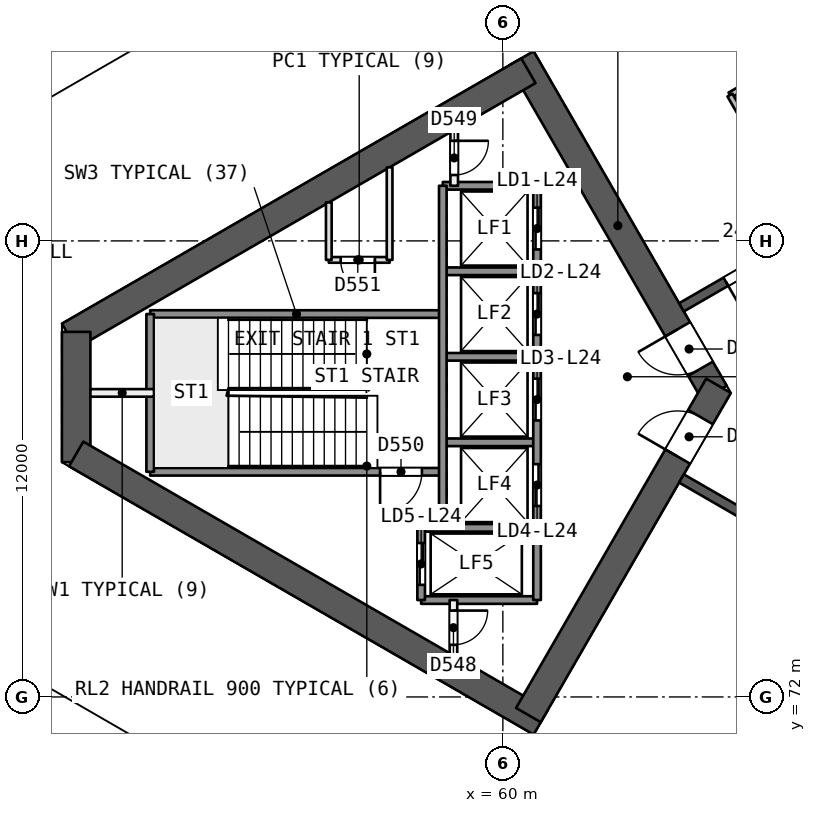
"""IFC4 building model, lengths in metres.
Left out: names, types, materials, properties, quantities, classifications, styles, units other than length and angle.
Written with IfcOpenShell. Run it as: python <this file> out.ifc"""

import sys

from ifc_helpers import new_model, si_unit, direction, frame, frame_2d, origin, place, context, subcontext, project, spatial, rectangle, extrude, element, fill, save


model = new_model("IFC4")
c1 = context("Model", 3, precision=1e-05, world=origin(), true_north=direction((0.0, 1.0)))
c2 = subcontext(c1, "Body", "Model", "MODEL_VIEW")
j1 = project(units=[si_unit("LENGTHUNIT", "METRE"), si_unit("PLANEANGLEUNIT", "RADIAN")], contexts=[c1])
p1 = place(None, origin())
s1 = spatial("IfcSite", under=j1, at=p1, CompositionType="ELEMENT")
p2 = place(p1, origin())
s2 = spatial("IfcBuilding", under=s1, at=p2, CompositionType="ELEMENT")
p3 = place(p2, frame((0.0, 0.0, 102.4)))
s3 = spatial("IfcBuildingStorey", under=s2, at=p3, CompositionType="ELEMENT", Elevation=102.4)
p4 = place(p3, frame((65.567, 80.0, 0.0), z_axis=(0.0, 0.0, 1.0), x_axis=(-0.499988615364, 0.866031976607, 0.0)))
e1 = element("IfcWall", 1, at=p4, inside=s3, PredefinedType="SHEAR", context=c2, shape_type="SweptSolid", body=[
    extrude(rectangle(XDim=10.163, YDim=0.75, at=frame_2d((5.082, 0.0))), origin(), (0.0, 0.0, 1.0), 4.4),
])
p5 = place(p4, frame((0.733, 0.0, 0.0)))
e2 = element("IfcOpeningElement", 2, at=p5, cuts=e1, PredefinedType="OPENING", context=c2, shape_type="SweptSolid", body=[
    extrude(rectangle(XDim=1.2, YDim=2.1, at=frame_2d((0.6, 1.05))), frame((0.0, 0.385, 0.0), z_axis=(0.0, -1.0, 0.0), x_axis=(1.0, 0.0, 0.0)), (0.0, 0.0, 1.0), 0.771),
])
p6 = place(p3, frame((60.673, 88.477, 0.0), z_axis=(0.0, 0.0, 1.0), x_axis=(-0.8660248072, -0.500001033313, 0.0)))
e3 = element("IfcWall", 3, at=p6, inside=s3, PredefinedType="SHEAR", context=c2, shape_type="SweptSolid", body=[
    extrude(rectangle(XDim=13.958, YDim=0.75, at=frame_2d((6.979, 0.0))), origin(), (0.0, 0.0, 1.0), 4.4),
])
p7 = place(p3, frame((48.772, 81.606, 0.0), z_axis=(0.0, 0.0, 1.0), x_axis=(0.0, -1.0, 0.0)))
e4 = element("IfcWall", 4, at=p7, inside=s3, PredefinedType="SHEAR", context=c2, shape_type="SweptSolid", body=[
    extrude(rectangle(XDim=3.429, YDim=0.75, at=frame_2d((1.714, 0.0))), origin(), (0.0, 0.0, 1.0), 4.4),
])
p8 = place(p3, frame((48.772, 78.394, 0.0), z_axis=(0.0, 0.0, 1.0), x_axis=(0.866028339916, -0.499994914436, 0.0)))
e5 = element("IfcWall", 5, at=p8, inside=s3, PredefinedType="SHEAR", context=c2, shape_type="SweptSolid", body=[
    extrude(rectangle(XDim=14.117, YDim=0.75, at=frame_2d((7.059, 0.0))), origin(), (0.0, 0.0, 1.0), 4.4),
])
p9 = place(p3, frame((60.673, 71.523, 0.0), z_axis=(0.0, 0.0, 1.0), x_axis=(0.499997052475, 0.866027105532, 0.0)))
e6 = element("IfcWall", 6, at=p9, inside=s3, PredefinedType="SHEAR", context=c2, shape_type="SweptSolid", body=[
    extrude(rectangle(XDim=10.005, YDim=0.75, at=frame_2d((5.002, 0.0))), origin(), (0.0, 0.0, 1.0), 4.4),
])
p10 = place(p9, frame((7.855, 0.0, 0.0)))
e7 = element("IfcOpeningElement", 7, at=p10, cuts=e6, PredefinedType="OPENING", context=c2, shape_type="SweptSolid", body=[
    extrude(rectangle(XDim=1.2, YDim=2.1, at=frame_2d((0.6, 1.05))), frame((0.0, 0.385, 0.0), z_axis=(0.0, -1.0, 0.0), x_axis=(1.0, 0.0, 0.0)), (0.0, 0.0, 1.0), 0.771),
])
p11 = place(p3, frame((78.2, 90.046, 0.0), z_axis=(0.0, 0.0, 1.0), x_axis=(-0.866026492143, -0.499998114903, 0.0)))
e8 = element("IfcWall", 8, at=p11, inside=s3, PredefinedType="SHEAR", context=c2, shape_type="SweptSolid", body=[
    extrude(rectangle(XDim=15.588, YDim=0.25, at=frame_2d((7.794, 0.0))), origin(), (0.0, 0.0, 1.0), 3.95),
])
p12 = place(p11, frame((2.907, 0.0, 0.0)))
e9 = element("IfcOpeningElement", 9, at=p12, cuts=e8, PredefinedType="OPENING", context=c2, shape_type="SweptSolid", body=[
    extrude(rectangle(XDim=1.2, YDim=2.4, at=frame_2d((0.6, 1.2))), frame((0.0, 0.135, 0.0), z_axis=(0.0, -1.0, 0.0), x_axis=(1.0, 0.0, 0.0)), (0.0, 0.0, 1.0), 0.271),
])
p13 = place(p11, frame((7.266, 0.0, 0.0)))
e10 = element("IfcOpeningElement", 10, at=p13, cuts=e8, PredefinedType="OPENING", context=c2, shape_type="SweptSolid", body=[
    extrude(rectangle(XDim=0.9, YDim=2.1, at=frame_2d((0.45, 1.05))), frame((0.0, 0.135, 0.0), z_axis=(0.0, -1.0, 0.0), x_axis=(1.0, 0.0, 0.0)), (0.0, 0.0, 1.0), 0.271),
])
p14 = place(p11, frame((8.669, 0.0, 0.0)))
e11 = element("IfcOpeningElement", 11, at=p14, cuts=e8, PredefinedType="OPENING", context=c2, shape_type="SweptSolid", body=[
    extrude(rectangle(XDim=0.9, YDim=2.1, at=frame_2d((0.45, 1.05))), frame((0.0, 0.135, 0.0), z_axis=(0.0, -1.0, 0.0), x_axis=(1.0, 0.0, 0.0)), (0.0, 0.0, 1.0), 0.271),
])
p15 = place(p11, frame((10.306, 0.0, 0.0)))
e12 = element("IfcOpeningElement", 12, at=p15, cuts=e8, PredefinedType="OPENING", context=c2, shape_type="SweptSolid", body=[
    extrude(rectangle(XDim=0.9, YDim=2.1, at=frame_2d((0.45, 1.05))), frame((0.0, 0.135, 0.0), z_axis=(0.0, -1.0, 0.0), x_axis=(1.0, 0.0, 0.0)), (0.0, 0.0, 1.0), 0.271),
])
p16 = place(p11, frame((13.04, 0.0, 0.0)))
e13 = element("IfcOpeningElement", 13, at=p16, cuts=e8, PredefinedType="OPENING", context=c2, shape_type="SweptSolid", body=[
    extrude(rectangle(XDim=1.2, YDim=2.4, at=frame_2d((0.6, 1.2))), frame((0.0, 0.135, 0.0), z_axis=(0.0, -1.0, 0.0), x_axis=(1.0, 0.0, 0.0)), (0.0, 0.0, 1.0), 0.271),
])
p17 = place(p3, frame((64.7, 77.748, 0.0), z_axis=(0.0, 0.0, 1.0), x_axis=(0.866026492143, -0.499998114903, 0.0)))
e14 = element("IfcWall", 14, at=p17, inside=s3, PredefinedType="SHEAR", context=c2, shape_type="SweptSolid", body=[
    extrude(rectangle(XDim=15.588, YDim=0.25, at=frame_2d((7.794, 0.0))), origin(), (0.0, 0.0, 1.0), 3.95),
])
p18 = place(p17, frame((3.297, 0.0, 0.0)))
e15 = element("IfcOpeningElement", 15, at=p18, cuts=e14, PredefinedType="OPENING", context=c2, shape_type="SweptSolid", body=[
    extrude(rectangle(XDim=1.2, YDim=2.4, at=frame_2d((0.6, 1.2))), frame((0.0, 0.135, 0.0), z_axis=(0.0, -1.0, 0.0), x_axis=(1.0, 0.0, 0.0)), (0.0, 0.0, 1.0), 0.271),
])
p19 = place(p17, frame((11.091, 0.0, 0.0)))
e16 = element("IfcOpeningElement", 16, at=p19, cuts=e14, PredefinedType="OPENING", context=c2, shape_type="SweptSolid", body=[
    extrude(rectangle(XDim=1.2, YDim=2.4, at=frame_2d((0.6, 1.2))), frame((0.0, 0.135, 0.0), z_axis=(0.0, -1.0, 0.0), x_axis=(1.0, 0.0, 0.0)), (0.0, 0.0, 1.0), 0.271),
])
p20 = place(p3, frame((70.025, 90.175, 0.0), z_axis=(0.0, 0.0, 1.0), x_axis=(-0.866004747009, -0.500035776878, 0.0)))
e17 = element("IfcWall", 17, at=p20, inside=s3, PredefinedType="PARTITIONING", context=c2, shape_type="SweptSolid", body=[
    extrude(rectangle(XDim=4.677, YDim=0.15, at=frame_2d((2.338, 0.0))), origin(), (0.0, 0.0, 1.0), 3.95),
])
p21 = place(p3, frame((65.976, 87.837, 0.0), z_axis=(0.0, 0.0, 1.0), x_axis=(0.499972428603, -0.866041321553, 0.0)))
e18 = element("IfcWall", 18, at=p21, inside=s3, PredefinedType="PARTITIONING", context=c2, shape_type="SweptSolid", body=[
    extrude(rectangle(XDim=4.199, YDim=0.15, at=frame_2d((2.1, 0.0))), origin(), (0.0, 0.0, 1.0), 3.95),
])
p22 = place(p3, frame((65.008, 62.693, 0.0), z_axis=(0.0, 0.0, 1.0), x_axis=(0.499996920331, 0.866027181825, 0.0)))
e19 = element("IfcWall", 19, at=p22, inside=s3, PredefinedType="PARTITIONING", context=c2, shape_type="SweptSolid", body=[
    extrude(rectangle(XDim=12.884, YDim=0.2, at=frame_2d((6.442, 0.0))), origin(), (0.0, 0.0, 1.0), 3.95),
])
p23 = place(p3, frame((60.9, 85.45, 0.0), z_axis=(0.0, 0.0, 1.0), x_axis=(-1.0, 0.0, 0.0)))
e20 = element("IfcWall", 20, at=p23, inside=s3, PredefinedType="SOLIDWALL", context=c2, shape_type="SweptSolid", body=[
    extrude(rectangle(XDim=2.48, YDim=0.2, at=frame_2d((1.24, 0.0))), origin(), (0.0, 0.0, 1.0), 3.95),
])
p24 = place(p3, frame((57.02, 83.5, 0.0), z_axis=(0.0, 0.0, 1.0), x_axis=(-1.0, 0.0, 0.0)))
e21 = element("IfcWall", 21, at=p24, inside=s3, PredefinedType="PARTITIONING", context=c2, shape_type="SweptSolid", body=[
    extrude(rectangle(XDim=1.6, YDim=0.15, at=frame_2d((0.8, 0.0))), origin(), (0.0, 0.0, 1.0), 3.95),
])
p25 = place(p24, frame((0.387, 0.0, 0.0)))
e22 = element("IfcOpeningElement", 22, at=p25, cuts=e21, PredefinedType="OPENING", context=c2, shape_type="SweptSolid", body=[
    extrude(rectangle(XDim=0.9, YDim=2.1, at=frame_2d((0.45, 1.05))), frame((0.0, 0.085, 0.0), z_axis=(0.0, -1.0, 0.0), x_axis=(1.0, 0.0, 0.0)), (0.0, 0.0, 1.0), 0.171),
])
p26 = place(p3, frame((60.9, 83.2, 0.0), z_axis=(0.0, 0.0, 1.0), x_axis=(-1.0, 0.0, 0.0)))
e23 = element("IfcWall", 23, at=p26, inside=s3, PredefinedType="SOLIDWALL", context=c2, shape_type="SweptSolid", body=[
    extrude(rectangle(XDim=2.48, YDim=0.2, at=frame_2d((1.24, 0.0))), origin(), (0.0, 0.0, 1.0), 3.95),
])
p27 = place(p3, frame((58.42, 82.075, 0.0), z_axis=(0.0, 0.0, 1.0), x_axis=(-1.0, 0.0, 0.0)))
e24 = element("IfcWall", 24, at=p27, inside=s3, PredefinedType="SOLIDWALL", context=c2, shape_type="SweptSolid", body=[
    extrude(rectangle(XDim=7.7, YDim=0.2, at=frame_2d((3.85, 0.0))), origin(), (0.0, 0.0, 1.0), 3.95),
])
p28 = place(p3, frame((60.9, 80.95, 0.0), z_axis=(0.0, 0.0, 1.0), x_axis=(-1.0, 0.0, 0.0)))
e25 = element("IfcWall", 25, at=p28, inside=s3, PredefinedType="SOLIDWALL", context=c2, shape_type="SweptSolid", body=[
    extrude(rectangle(XDim=2.48, YDim=0.2, at=frame_2d((1.24, 0.0))), origin(), (0.0, 0.0, 1.0), 3.95),
])
p29 = place(p3, frame((50.82, 80.0, 0.0), z_axis=(0.0, 0.0, 1.0), x_axis=(-1.0, 0.0, 0.0)))
e26 = element("IfcWall", 26, at=p29, inside=s3, PredefinedType="PARTITIONING", context=c2, shape_type="SweptSolid", body=[
    extrude(rectangle(XDim=1.673, YDim=0.2, at=frame_2d((0.836, 0.0))), origin(), (0.0, 0.0, 1.0), 3.95),
])
p30 = place(p3, frame((60.9, 78.7, 0.0), z_axis=(0.0, 0.0, 1.0), x_axis=(-1.0, 0.0, 0.0)))
e27 = element("IfcWall", 27, at=p30, inside=s3, PredefinedType="SOLIDWALL", context=c2, shape_type="SweptSolid", body=[
    extrude(rectangle(XDim=2.48, YDim=0.2, at=frame_2d((1.24, 0.0))), origin(), (0.0, 0.0, 1.0), 3.95),
])
p31 = place(p3, frame((58.42, 77.925, 0.0), z_axis=(0.0, 0.0, 1.0), x_axis=(-1.0, 0.0, 0.0)))
e28 = element("IfcWall", 28, at=p31, inside=s3, PredefinedType="SOLIDWALL", context=c2, shape_type="SweptSolid", body=[
    extrude(rectangle(XDim=7.7, YDim=0.2, at=frame_2d((3.85, 0.0))), origin(), (0.0, 0.0, 1.0), 3.95),
])
p32 = place(p31, frame((0.55, 0.0, 0.0)))
e29 = element("IfcOpeningElement", 29, at=p32, cuts=e28, PredefinedType="OPENING", context=c2, shape_type="SweptSolid", body=[
    extrude(rectangle(XDim=1.1, YDim=2.1, at=frame_2d((0.55, 1.05))), frame((0.0, 0.11, 0.0), z_axis=(0.0, -1.0, 0.0), x_axis=(1.0, 0.0, 0.0)), (0.0, 0.0, 1.0), 0.221),
])
for number, where, z_axis, x_axis in (
    (30, (60.9, 76.45, 0.0), (0.0, 0.0, 1.0), (-1.0, 0.0, 0.0)),
    (31, (60.9, 74.55, 0.0), (0.0, 0.0, 1.0), (-1.0, 0.0, 0.0)),
):
    element("IfcWall", number, at=place(p3, frame(where, z_axis=z_axis, x_axis=x_axis)), inside=s3, PredefinedType="SOLIDWALL", context=c2, shape_type="SweptSolid", body=[
        extrude(rectangle(XDim=3.05, YDim=0.2, at=frame_2d((1.525, 0.0))), origin(), (0.0, 0.0, 1.0), 3.95),
    ])
p33 = place(p3, frame((60.9, 85.45, 0.0), z_axis=(0.0, 0.0, 1.0), x_axis=(0.0, -1.0, 0.0)))
e32 = element("IfcWall", 32, at=p33, inside=s3, PredefinedType="SOLIDWALL", context=c2, shape_type="SweptSolid", body=[
    extrude(rectangle(XDim=10.9, YDim=0.2, at=frame_2d((5.45, 0.0))), origin(), (0.0, 0.0, 1.0), 3.95),
])
p34 = place(p33, frame((0.575, 0.0, 0.0)))
e33 = element("IfcOpeningElement", 33, at=p34, cuts=e32, PredefinedType="OPENING", context=c2, shape_type="SweptSolid", body=[
    extrude(rectangle(XDim=1.1, YDim=2.1, at=frame_2d((0.55, 1.05))), frame((0.0, 0.11, 0.0), z_axis=(0.0, -1.0, 0.0), x_axis=(1.0, 0.0, 0.0)), (0.0, 0.0, 1.0), 0.221),
])
p35 = place(p33, frame((2.825, 0.0, 0.0)))
e34 = element("IfcOpeningElement", 34, at=p35, cuts=e32, PredefinedType="OPENING", context=c2, shape_type="SweptSolid", body=[
    extrude(rectangle(XDim=1.1, YDim=2.1, at=frame_2d((0.55, 1.05))), frame((0.0, 0.11, 0.0), z_axis=(0.0, -1.0, 0.0), x_axis=(1.0, 0.0, 0.0)), (0.0, 0.0, 1.0), 0.221),
])
p36 = place(p33, frame((5.075, 0.0, 0.0)))
e35 = element("IfcOpeningElement", 35, at=p36, cuts=e32, PredefinedType="OPENING", context=c2, shape_type="SweptSolid", body=[
    extrude(rectangle(XDim=1.1, YDim=2.1, at=frame_2d((0.55, 1.05))), frame((0.0, 0.11, 0.0), z_axis=(0.0, -1.0, 0.0), x_axis=(1.0, 0.0, 0.0)), (0.0, 0.0, 1.0), 0.221),
])
p37 = place(p33, frame((7.325, 0.0, 0.0)))
e36 = element("IfcOpeningElement", 36, at=p37, cuts=e32, PredefinedType="OPENING", context=c2, shape_type="SweptSolid", body=[
    extrude(rectangle(XDim=1.1, YDim=2.1, at=frame_2d((0.55, 1.05))), frame((0.0, 0.11, 0.0), z_axis=(0.0, -1.0, 0.0), x_axis=(1.0, 0.0, 0.0)), (0.0, 0.0, 1.0), 0.221),
])
p38 = place(p3, frame((58.72, 86.917, 0.0), z_axis=(0.0, 0.0, 1.0), x_axis=(0.0, -1.0, 0.0)))
e37 = element("IfcWall", 37, at=p38, inside=s3, PredefinedType="PARTITIONING", context=c2, shape_type="SweptSolid", body=[
    extrude(rectangle(XDim=1.467, YDim=0.2, at=frame_2d((0.733, 0.0))), origin(), (0.0, 0.0, 1.0), 3.95),
])
p39 = place(p38, frame((0.283, 0.0, 0.0)))
e38 = element("IfcOpeningElement", 38, at=p39, cuts=e37, PredefinedType="OPENING", context=c2, shape_type="SweptSolid", body=[
    extrude(rectangle(XDim=0.9, YDim=2.1, at=frame_2d((0.45, 1.05))), frame((0.0, 0.11, 0.0), z_axis=(0.0, -1.0, 0.0), x_axis=(1.0, 0.0, 0.0)), (0.0, 0.0, 1.0), 0.221),
])
p40 = place(p3, frame((58.7, 74.55, 0.0), z_axis=(0.0, 0.0, 1.0), x_axis=(0.0, -1.0, 0.0)))
e39 = element("IfcWall", 39, at=p40, inside=s3, PredefinedType="PARTITIONING", context=c2, shape_type="SweptSolid", body=[
    extrude(rectangle(XDim=1.455, YDim=0.2, at=frame_2d((0.728, 0.0))), origin(), (0.0, 0.0, 1.0), 3.95),
])
p41 = place(p40, frame((0.278, 0.0, 0.0)))
e40 = element("IfcOpeningElement", 40, at=p41, cuts=e39, PredefinedType="OPENING", context=c2, shape_type="SweptSolid", body=[
    extrude(rectangle(XDim=0.9, YDim=2.1, at=frame_2d((0.45, 1.05))), frame((0.0, 0.11, 0.0), z_axis=(0.0, -1.0, 0.0), x_axis=(1.0, 0.0, 0.0)), (0.0, 0.0, 1.0), 0.221),
])
p42 = place(p3, frame((58.42, 85.45, 0.0), z_axis=(0.0, 0.0, 1.0), x_axis=(0.0, -1.0, 0.0)))
e41 = element("IfcWall", 41, at=p42, inside=s3, PredefinedType="SOLIDWALL", context=c2, shape_type="SweptSolid", body=[
    extrude(rectangle(XDim=9.0, YDim=0.2, at=frame_2d((4.5, 0.0))), origin(), (0.0, 0.0, 1.0), 3.95),
])
p43 = place(p3, frame((57.85, 76.45, 0.0), z_axis=(0.0, 0.0, 1.0), x_axis=(0.0, -1.0, 0.0)))
e42 = element("IfcWall", 42, at=p43, inside=s3, PredefinedType="SOLIDWALL", context=c2, shape_type="SweptSolid", body=[
    extrude(rectangle(XDim=1.9, YDim=0.2, at=frame_2d((0.95, 0.0))), origin(), (0.0, 0.0, 1.0), 3.95),
])
p44 = place(p43, frame((0.4, 0.0, 0.0)))
e43 = element("IfcOpeningElement", 43, at=p44, cuts=e42, PredefinedType="OPENING", context=c2, shape_type="SweptSolid", body=[
    extrude(rectangle(XDim=1.1, YDim=2.1, at=frame_2d((0.55, 1.05))), frame((0.0, 0.11, 0.0), z_axis=(0.0, -1.0, 0.0), x_axis=(1.0, 0.0, 0.0)), (0.0, 0.0, 1.0), 0.221),
])
p45 = place(p3, frame((57.02, 85.935, 0.0), z_axis=(0.0, 0.0, 1.0), x_axis=(0.0, -1.0, 0.0)))
e44 = element("IfcWall", 44, at=p45, inside=s3, PredefinedType="PARTITIONING", context=c2, shape_type="SweptSolid", body=[
    extrude(rectangle(XDim=2.435, YDim=0.15, at=frame_2d((1.218, 0.0))), origin(), (0.0, 0.0, 1.0), 3.95),
])
p46 = place(p3, frame((55.42, 85.011, 0.0), z_axis=(0.0, 0.0, 1.0), x_axis=(0.0, -1.0, 0.0)))
e45 = element("IfcWall", 45, at=p46, inside=s3, PredefinedType="PARTITIONING", context=c2, shape_type="SweptSolid", body=[
    extrude(rectangle(XDim=1.511, YDim=0.15, at=frame_2d((0.756, 0.0))), origin(), (0.0, 0.0, 1.0), 3.95),
])
p47 = place(p3, frame((50.72, 82.075, 0.0), z_axis=(0.0, 0.0, 1.0), x_axis=(0.0, -1.0, 0.0)))
e46 = element("IfcWall", 46, at=p47, inside=s3, PredefinedType="SOLIDWALL", context=c2, shape_type="SweptSolid", body=[
    extrude(rectangle(XDim=4.15, YDim=0.2, at=frame_2d((2.075, 0.0))), origin(), (0.0, 0.0, 1.0), 3.95),
])
p48 = place(p16, origin())
e47 = element("IfcDoor", 47, at=p48, inside=s3, OperationType="SINGLE_SWING_RIGHT", PredefinedType="NOTDEFINED", context=c2, shape_type="SweptSolid", body=[
    extrude(rectangle(XDim=1.2, YDim=2.4, at=frame_2d((0.6, 1.2))), frame((0.0, 0.025, 0.0), z_axis=(0.0, -1.0, 0.0), x_axis=(1.0, 0.0, 0.0)), (0.0, 0.0, 1.0), 0.05),
])
fill(e13, e47)
p49 = place(p5, origin())
e48 = element("IfcDoor", 48, at=p49, inside=s3, OperationType="SINGLE_SWING_RIGHT", PredefinedType="NOTDEFINED", context=c2, shape_type="SweptSolid", body=[
    extrude(rectangle(XDim=1.2, YDim=2.1, at=frame_2d((0.6, 1.05))), frame((0.0, 0.025, 0.0), z_axis=(0.0, -1.0, 0.0), x_axis=(1.0, 0.0, 0.0)), (0.0, 0.0, 1.0), 0.05),
])
fill(e2, e48)
p50 = place(p10, origin())
e49 = element("IfcDoor", 49, at=p50, inside=s3, OperationType="SINGLE_SWING_LEFT", PredefinedType="NOTDEFINED", context=c2, shape_type="SweptSolid", body=[
    extrude(rectangle(XDim=1.2, YDim=2.1, at=frame_2d((0.6, 1.05))), frame((0.0, 0.025, 0.0), z_axis=(0.0, -1.0, 0.0), x_axis=(1.0, 0.0, 0.0)), (0.0, 0.0, 1.0), 0.05),
])
fill(e7, e49)
p51 = place(p34, origin())
e50 = element("IfcDoor", 50, at=p51, inside=s3, OperationType="SLIDING_TO_RIGHT", PredefinedType="NOTDEFINED", context=c2, shape_type="SweptSolid", body=[
    extrude(rectangle(XDim=1.1, YDim=2.1, at=frame_2d((0.55, 1.05))), frame((0.0, 0.025, 0.0), z_axis=(0.0, -1.0, 0.0), x_axis=(1.0, 0.0, 0.0)), (0.0, 0.0, 1.0), 0.05),
])
fill(e33, e50)
p52 = place(p35, origin())
e51 = element("IfcDoor", 51, at=p52, inside=s3, OperationType="SLIDING_TO_LEFT", PredefinedType="NOTDEFINED", context=c2, shape_type="SweptSolid", body=[
    extrude(rectangle(XDim=1.1, YDim=2.1, at=frame_2d((0.55, 1.05))), frame((0.0, 0.025, 0.0), z_axis=(0.0, -1.0, 0.0), x_axis=(1.0, 0.0, 0.0)), (0.0, 0.0, 1.0), 0.05),
])
fill(e34, e51)
p53 = place(p36, origin())
e52 = element("IfcDoor", 52, at=p53, inside=s3, OperationType="SLIDING_TO_RIGHT", PredefinedType="NOTDEFINED", context=c2, shape_type="SweptSolid", body=[
    extrude(rectangle(XDim=1.1, YDim=2.1, at=frame_2d((0.55, 1.05))), frame((0.0, 0.025, 0.0), z_axis=(0.0, -1.0, 0.0), x_axis=(1.0, 0.0, 0.0)), (0.0, 0.0, 1.0), 0.05),
])
fill(e35, e52)
p54 = place(p37, origin())
e53 = element("IfcDoor", 53, at=p54, inside=s3, OperationType="SLIDING_TO_LEFT", PredefinedType="NOTDEFINED", context=c2, shape_type="SweptSolid", body=[
    extrude(rectangle(XDim=1.1, YDim=2.1, at=frame_2d((0.55, 1.05))), frame((0.0, 0.025, 0.0), z_axis=(0.0, -1.0, 0.0), x_axis=(1.0, 0.0, 0.0)), (0.0, 0.0, 1.0), 0.05),
])
fill(e36, e53)
p55 = place(p44, origin())
e54 = element("IfcDoor", 54, at=p55, inside=s3, OperationType="SLIDING_TO_RIGHT", PredefinedType="NOTDEFINED", context=c2, shape_type="SweptSolid", body=[
    extrude(rectangle(XDim=1.1, YDim=2.1, at=frame_2d((0.55, 1.05))), frame((0.0, 0.025, 0.0), z_axis=(0.0, -1.0, 0.0), x_axis=(1.0, 0.0, 0.0)), (0.0, 0.0, 1.0), 0.05),
])
fill(e43, e54)
p56 = place(p41, origin())
e55 = element("IfcDoor", 55, at=p56, inside=s3, OperationType="SINGLE_SWING_LEFT", PredefinedType="NOTDEFINED", context=c2, shape_type="SweptSolid", body=[
    extrude(rectangle(XDim=0.9, YDim=2.1, at=frame_2d((0.45, 1.05))), frame((0.0, 0.025, 0.0), z_axis=(0.0, -1.0, 0.0), x_axis=(1.0, 0.0, 0.0)), (0.0, 0.0, 1.0), 0.05),
])
fill(e40, e55)
p57 = place(p39, origin())
e56 = element("IfcDoor", 56, at=p57, inside=s3, OperationType="SINGLE_SWING_LEFT", PredefinedType="NOTDEFINED", context=c2, shape_type="SweptSolid", body=[
    extrude(rectangle(XDim=0.9, YDim=2.1, at=frame_2d((0.45, 1.05))), frame((0.0, 0.025, 0.0), z_axis=(0.0, -1.0, 0.0), x_axis=(1.0, 0.0, 0.0)), (0.0, 0.0, 1.0), 0.05),
])
fill(e38, e56)
p58 = place(p32, origin())
e57 = element("IfcDoor", 57, at=p58, inside=s3, OperationType="SINGLE_SWING_RIGHT", PredefinedType="NOTDEFINED", context=c2, shape_type="SweptSolid", body=[
    extrude(rectangle(XDim=1.1, YDim=2.1, at=frame_2d((0.55, 1.05))), frame((0.0, 0.025, 0.0), z_axis=(0.0, -1.0, 0.0), x_axis=(1.0, 0.0, 0.0)), (0.0, 0.0, 1.0), 0.05),
])
fill(e29, e57)
p59 = place(p25, origin())
e58 = element("IfcDoor", 58, at=p59, inside=s3, OperationType="SINGLE_SWING_LEFT", PredefinedType="NOTDEFINED", context=c2, shape_type="SweptSolid", body=[
    extrude(rectangle(XDim=0.9, YDim=2.1, at=frame_2d((0.45, 1.05))), frame((0.0, 0.025, 0.0), z_axis=(0.0, -1.0, 0.0), x_axis=(1.0, 0.0, 0.0)), (0.0, 0.0, 1.0), 0.05),
])
fill(e22, e58)
save(model, sys.argv[1])
